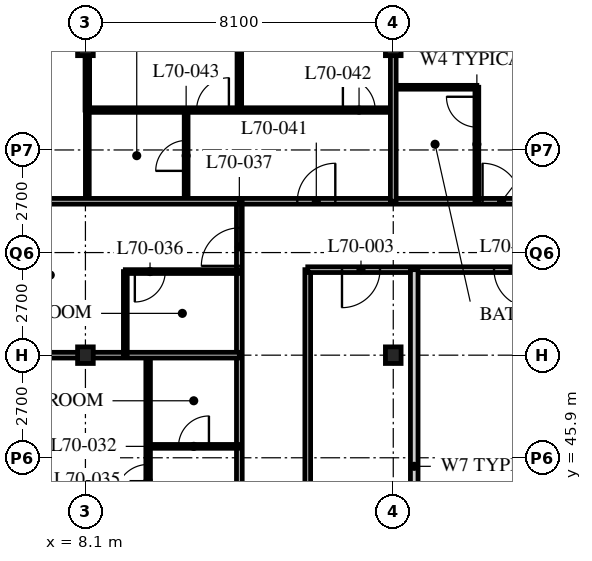
"""IFC4 building model, lengths in metres.
Left out: names, types, materials, properties, quantities, classifications, styles, units other than length and angle.
Written with IfcOpenShell. Run it as: python <this file> out.ifc"""

import sys

from ifc_helpers import new_model, si_unit, direction, frame, frame_2d, origin, origin_2d, place, context, subcontext, project, spatial, rectangle, i_section, extrude, element, fill, save


model = new_model("IFC4")
c1 = context("Model", 3, precision=1e-05, world=origin(), true_north=direction((0.0, 1.0)))
c2 = subcontext(c1, "Body", "Model", "MODEL_VIEW")
j1 = project(units=[si_unit("LENGTHUNIT", "METRE"), si_unit("PLANEANGLEUNIT", "RADIAN")], contexts=[c1])
p1 = place(None, origin())
s1 = spatial("IfcSite", under=j1, at=p1, CompositionType="ELEMENT")
p2 = place(p1, origin())
s2 = spatial("IfcBuilding", under=s1, at=p2, CompositionType="ELEMENT")
p3 = place(p2, frame((0.0, 0.0, 273.6)))
s3 = spatial("IfcBuildingStorey", under=s2, at=p3, CompositionType="ELEMENT", Elevation=273.6)
for number, where, z_axis, x_axis in (
    (1, (8.1, 48.6, 0.0), (0.0, 0.0, 1.0), (1.0, 0.0, 0.0)),
    (2, (8.1, 56.7, 0.0), (0.0, 0.0, 1.0), (1.0, 0.0, 0.0)),
    (3, (16.2, 48.6, 0.0), (0.0, 0.0, 1.0), (1.0, 0.0, 0.0)),
    (4, (16.2, 56.7, 0.0), (0.0, 0.0, 1.0), (1.0, 0.0, 0.0)),
):
    element("IfcColumn", number, at=place(p3, frame(where, z_axis=z_axis, x_axis=x_axis)), inside=s3, PredefinedType="COLUMN", context=c2, shape_type="SweptSolid", body=[
        extrude(i_section(OverallWidth=0.412, OverallDepth=0.437, WebThickness=0.036, FlangeThickness=0.058, FilletRadius=0.015, at=origin_2d()), origin(), (0.0, 0.0, 1.0), 3.9),
    ])
p4 = place(p3, frame((12.15, 52.65, 0.0), z_axis=(0.0, 0.0, 1.0), x_axis=(1.0, 0.0, 0.0)))
e5 = element("IfcWall", 5, at=p4, inside=s3, PredefinedType="PARTITIONING", context=c2, shape_type="SweptSolid", body=[
    extrude(rectangle(XDim=24.3, YDim=0.15, at=frame_2d((12.15, 0.0))), origin(), (0.0, 0.0, 1.0), 3.69),
])
p5 = place(p4, frame((6.4, 0.0, 0.0)))
e6 = element("IfcOpeningElement", 6, at=p5, cuts=e5, PredefinedType="OPENING", context=c2, shape_type="SweptSolid", body=[
    extrude(rectangle(XDim=1.0, YDim=2.1, at=frame_2d((0.5, 1.05))), frame((0.0, 0.085, 0.0), z_axis=(0.0, -1.0, 0.0), x_axis=(1.0, 0.0, 0.0)), (0.0, 0.0, 1.0), 0.17),
])
p6 = place(p4, frame((8.5, 0.0, 0.0)))
e7 = element("IfcOpeningElement", 7, at=p6, cuts=e5, PredefinedType="OPENING", context=c2, shape_type="SweptSolid", body=[
    extrude(rectangle(XDim=1.0, YDim=2.1, at=frame_2d((0.5, 1.05))), frame((0.0, 0.085, 0.0), z_axis=(0.0, -1.0, 0.0), x_axis=(1.0, 0.0, 0.0)), (0.0, 0.0, 1.0), 0.17),
])
p7 = place(p4, frame((16.6, 0.0, 0.0)))
e8 = element("IfcOpeningElement", 8, at=p7, cuts=e5, PredefinedType="OPENING", context=c2, shape_type="SweptSolid", body=[
    extrude(rectangle(XDim=1.0, YDim=2.1, at=frame_2d((0.5, 1.05))), frame((0.0, 0.085, 0.0), z_axis=(0.0, -1.0, 0.0), x_axis=(1.0, 0.0, 0.0)), (0.0, 0.0, 1.0), 0.17),
])
p8 = place(p4, frame((1.525, 0.0, 0.0)))
e9 = element("IfcOpeningElement", 9, at=p8, cuts=e5, PredefinedType="OPENING", context=c2, shape_type="SweptSolid", body=[
    extrude(rectangle(XDim=1.0, YDim=2.1, at=frame_2d((0.5, 1.05))), frame((0.0, 0.085, 0.0), z_axis=(0.0, -1.0, 0.0), x_axis=(1.0, 0.0, 0.0)), (0.0, 0.0, 1.0), 0.17),
])
p9 = place(p3, frame((12.15, 22.5, 0.0), z_axis=(0.0, 0.0, 1.0), x_axis=(0.0, 1.0, 0.0)))
e10 = element("IfcWall", 10, at=p9, inside=s3, PredefinedType="PARTITIONING", context=c2, shape_type="SweptSolid", body=[
    extrude(rectangle(XDim=30.15, YDim=0.15, at=frame_2d((15.075, 0.0))), origin(), (0.0, 0.0, 1.0), 3.69),
])
p10 = place(p9, frame((0.4, 0.0, 0.0)))
e11 = element("IfcOpeningElement", 11, at=p10, cuts=e10, PredefinedType="OPENING", context=c2, shape_type="SweptSolid", body=[
    extrude(rectangle(XDim=1.0, YDim=2.1, at=frame_2d((0.5, 1.05))), frame((0.0, 0.085, 0.0), z_axis=(0.0, -1.0, 0.0), x_axis=(1.0, 0.0, 0.0)), (0.0, 0.0, 1.0), 0.17),
])
p11 = place(p9, frame((18.4, 0.0, 0.0)))
e12 = element("IfcOpeningElement", 12, at=p11, cuts=e10, PredefinedType="OPENING", context=c2, shape_type="SweptSolid", body=[
    extrude(rectangle(XDim=1.0, YDim=2.1, at=frame_2d((0.5, 1.05))), frame((0.0, 0.085, 0.0), z_axis=(0.0, -1.0, 0.0), x_axis=(1.0, 0.0, 0.0)), (0.0, 0.0, 1.0), 0.17),
])
p12 = place(p9, frame((28.45, 0.0, 0.0)))
e13 = element("IfcOpeningElement", 13, at=p12, cuts=e10, PredefinedType="OPENING", context=c2, shape_type="SweptSolid", body=[
    extrude(rectangle(XDim=1.0, YDim=2.1, at=frame_2d((0.5, 1.05))), frame((0.0, 0.085, 0.0), z_axis=(0.0, -1.0, 0.0), x_axis=(1.0, 0.0, 0.0)), (0.0, 0.0, 1.0), 0.17),
])
p13 = place(p3, frame((13.95, 24.3, 0.0), z_axis=(0.0, 0.0, 1.0), x_axis=(0.0, 1.0, 0.0)))
e14 = element("IfcWall", 14, at=p13, inside=s3, PredefinedType="PARTITIONING", context=c2, shape_type="SweptSolid", body=[
    extrude(rectangle(XDim=26.55, YDim=0.15, at=frame_2d((13.275, 0.0))), origin(), (0.0, 0.0, 1.0), 3.69),
])
p14 = place(p13, frame((3.55, 0.0, 0.0)))
e15 = element("IfcOpeningElement", 15, at=p14, cuts=e14, PredefinedType="OPENING", context=c2, shape_type="SweptSolid", body=[
    extrude(rectangle(XDim=1.0, YDim=2.1, at=frame_2d((0.5, 1.05))), frame((0.0, 0.085, 0.0), z_axis=(0.0, -1.0, 0.0), x_axis=(1.0, 0.0, 0.0)), (0.0, 0.0, 1.0), 0.17),
])
p15 = place(p13, frame((11.65, 0.0, 0.0)))
e16 = element("IfcOpeningElement", 16, at=p15, cuts=e14, PredefinedType="OPENING", context=c2, shape_type="SweptSolid", body=[
    extrude(rectangle(XDim=1.0, YDim=2.1, at=frame_2d((0.5, 1.05))), frame((0.0, 0.085, 0.0), z_axis=(0.0, -1.0, 0.0), x_axis=(1.0, 0.0, 0.0)), (0.0, 0.0, 1.0), 0.17),
])
p16 = place(p3, frame((13.95, 50.85, 0.0), z_axis=(0.0, 0.0, 1.0), x_axis=(1.0, 0.0, 0.0)))
e17 = element("IfcWall", 17, at=p16, inside=s3, PredefinedType="PARTITIONING", context=c2, shape_type="SweptSolid", body=[
    extrude(rectangle(XDim=13.19, YDim=0.15, at=frame_2d((6.595, 0.0))), origin(), (0.0, 0.0, 1.0), 3.69),
])
p17 = place(p16, frame((0.901, 0.0, 0.0)))
e18 = element("IfcOpeningElement", 18, at=p17, cuts=e17, PredefinedType="OPENING", context=c2, shape_type="SweptSolid", body=[
    extrude(rectangle(XDim=1.0, YDim=2.1, at=frame_2d((0.5, 1.05))), frame((0.0, 0.085, 0.0), z_axis=(0.0, -1.0, 0.0), x_axis=(1.0, 0.0, 0.0)), (0.0, 0.0, 1.0), 0.17),
])
p18 = place(p16, frame((4.901, 0.0, 0.0)))
e19 = element("IfcOpeningElement", 19, at=p18, cuts=e17, PredefinedType="OPENING", context=c2, shape_type="SweptSolid", body=[
    extrude(rectangle(XDim=1.0, YDim=2.1, at=frame_2d((0.5, 1.05))), frame((0.0, 0.085, 0.0), z_axis=(0.0, -1.0, 0.0), x_axis=(1.0, 0.0, 0.0)), (0.0, 0.0, 1.0), 0.17),
])
p19 = place(p16, frame((10.101, 0.0, 0.0)))
e20 = element("IfcOpeningElement", 20, at=p19, cuts=e17, PredefinedType="OPENING", context=c2, shape_type="SweptSolid", body=[
    extrude(rectangle(XDim=1.0, YDim=2.1, at=frame_2d((0.5, 1.05))), frame((0.0, 0.085, 0.0), z_axis=(0.0, -1.0, 0.0), x_axis=(1.0, 0.0, 0.0)), (0.0, 0.0, 1.0), 0.17),
])
p20 = place(p3, frame((16.752, 50.85, 0.0), z_axis=(0.0, 0.0, 1.0), x_axis=(0.0, -1.0, 0.0)))
e21 = element("IfcWall", 21, at=p20, inside=s3, PredefinedType="SOLIDWALL", context=c2, shape_type="SweptSolid", body=[
    extrude(rectangle(XDim=10.35, YDim=0.2, at=frame_2d((5.175, 0.0))), origin(), (0.0, 0.0, 1.0), 3.69),
])
p21 = place(p3, frame((16.2, 55.65, 0.0), z_axis=(0.0, 0.0, 1.0), x_axis=(1.0, 0.0, 0.0)))
e22 = element("IfcWall", 22, at=p21, inside=s3, PredefinedType="PARTITIONING", context=c2, shape_type="SweptSolid", body=[
    extrude(rectangle(XDim=2.2, YDim=0.1, at=frame_2d((1.1, 0.0))), origin(), (0.0, 0.0, 1.0), 3.69),
])
p22 = place(p3, frame((18.4, 52.65, 0.0), z_axis=(0.0, 0.0, 1.0), x_axis=(0.0, 1.0, 0.0)))
e23 = element("IfcWall", 23, at=p22, inside=s3, PredefinedType="PARTITIONING", context=c2, shape_type="SweptSolid", body=[
    extrude(rectangle(XDim=3.0, YDim=0.1, at=frame_2d((1.5, 0.0))), origin(), (0.0, 0.0, 1.0), 3.69),
])
p23 = place(p22, frame((1.95, 0.0, 0.0)))
e24 = element("IfcOpeningElement", 24, at=p23, cuts=e23, PredefinedType="OPENING", context=c2, shape_type="SweptSolid", body=[
    extrude(rectangle(XDim=0.8, YDim=2.1, at=frame_2d((0.4, 1.05))), frame((0.0, 0.06, 0.0), z_axis=(0.0, -1.0, 0.0), x_axis=(1.0, 0.0, 0.0)), (0.0, 0.0, 1.0), 0.12),
])
p24 = place(p3, frame((9.75, 22.5, 0.0), z_axis=(0.0, 0.0, 1.0), x_axis=(0.0, 1.0, 0.0)))
e25 = element("IfcWall", 25, at=p24, inside=s3, PredefinedType="PARTITIONING", context=c2, shape_type="SweptSolid", body=[
    extrude(rectangle(XDim=26.1, YDim=0.12, at=frame_2d((13.05, 0.0))), origin(), (0.0, 0.0, 1.0), 3.69),
])
p25 = place(p24, frame((0.975, 0.0, 0.0)))
e26 = element("IfcOpeningElement", 26, at=p25, cuts=e25, PredefinedType="OPENING", context=c2, shape_type="SweptSolid", body=[
    extrude(rectangle(XDim=0.85, YDim=2.1, at=frame_2d((0.425, 1.05))), frame((0.0, 0.07, 0.0), z_axis=(0.0, -1.0, 0.0), x_axis=(1.0, 0.0, 0.0)), (0.0, 0.0, 1.0), 0.14),
])
p26 = place(p24, frame((10.225, 0.0, 0.0)))
e27 = element("IfcOpeningElement", 27, at=p26, cuts=e25, PredefinedType="OPENING", context=c2, shape_type="SweptSolid", body=[
    extrude(rectangle(XDim=0.85, YDim=2.1, at=frame_2d((0.425, 1.05))), frame((0.0, 0.07, 0.0), z_axis=(0.0, -1.0, 0.0), x_axis=(1.0, 0.0, 0.0)), (0.0, 0.0, 1.0), 0.14),
])
p27 = place(p24, frame((14.275, 0.0, 0.0)))
e28 = element("IfcOpeningElement", 28, at=p27, cuts=e25, PredefinedType="OPENING", context=c2, shape_type="SweptSolid", body=[
    extrude(rectangle(XDim=0.85, YDim=2.1, at=frame_2d((0.425, 1.05))), frame((0.0, 0.07, 0.0), z_axis=(0.0, -1.0, 0.0), x_axis=(1.0, 0.0, 0.0)), (0.0, 0.0, 1.0), 0.14),
])
p28 = place(p24, frame((18.975, 0.0, 0.0)))
e29 = element("IfcOpeningElement", 29, at=p28, cuts=e25, PredefinedType="OPENING", context=c2, shape_type="SweptSolid", body=[
    extrude(rectangle(XDim=0.85, YDim=2.1, at=frame_2d((0.425, 1.05))), frame((0.0, 0.07, 0.0), z_axis=(0.0, -1.0, 0.0), x_axis=(1.0, 0.0, 0.0)), (0.0, 0.0, 1.0), 0.14),
])
p29 = place(p24, frame((22.375, 0.0, 0.0)))
e30 = element("IfcOpeningElement", 30, at=p29, cuts=e25, PredefinedType="OPENING", context=c2, shape_type="SweptSolid", body=[
    extrude(rectangle(XDim=0.85, YDim=2.1, at=frame_2d((0.425, 1.05))), frame((0.0, 0.07, 0.0), z_axis=(0.0, -1.0, 0.0), x_axis=(1.0, 0.0, 0.0)), (0.0, 0.0, 1.0), 0.14),
])
p30 = place(p3, frame((12.15, 46.2, 0.0), z_axis=(0.0, 0.0, 1.0), x_axis=(-1.0, 0.0, 0.0)))
e31 = element("IfcWall", 31, at=p30, inside=s3, PredefinedType="PARTITIONING", context=c2, shape_type="SweptSolid", body=[
    extrude(rectangle(XDim=2.4, YDim=0.1, at=frame_2d((1.2, 0.0))), origin(), (0.0, 0.0, 1.0), 3.69),
])
p31 = place(p30, frame((0.8, 0.0, 0.0)))
e32 = element("IfcOpeningElement", 32, at=p31, cuts=e31, PredefinedType="OPENING", context=c2, shape_type="SweptSolid", body=[
    extrude(rectangle(XDim=0.8, YDim=2.1, at=frame_2d((0.4, 1.05))), frame((0.0, 0.06, 0.0), z_axis=(0.0, -1.0, 0.0), x_axis=(1.0, 0.0, 0.0)), (0.0, 0.0, 1.0), 0.12),
])
p32 = place(p3, frame((12.15, 48.6, 0.0), z_axis=(0.0, 0.0, 1.0), x_axis=(-1.0, 0.0, 0.0)))
e33 = element("IfcWall", 33, at=p32, inside=s3, PredefinedType="PARTITIONING", context=c2, shape_type="SweptSolid", body=[
    extrude(rectangle(XDim=11.85, YDim=0.15, at=frame_2d((5.925, 0.0))), origin(), (0.0, 0.0, 1.0), 3.078),
])
p33 = place(p3, frame((9.15, 48.6, 0.0), z_axis=(0.0, 0.0, 1.0), x_axis=(0.0, 1.0, 0.0)))
e34 = element("IfcWall", 34, at=p33, inside=s3, PredefinedType="PARTITIONING", context=c2, shape_type="SweptSolid", body=[
    extrude(rectangle(XDim=2.2, YDim=0.1, at=frame_2d((1.1, 0.0))), origin(), (0.0, 0.0, 1.0), 3.69),
])
p34 = place(p3, frame((12.15, 50.8, 0.0), z_axis=(0.0, 0.0, 1.0), x_axis=(-1.0, 0.0, 0.0)))
e35 = element("IfcWall", 35, at=p34, inside=s3, PredefinedType="PARTITIONING", context=c2, shape_type="SweptSolid", body=[
    extrude(rectangle(XDim=3.0, YDim=0.1, at=frame_2d((1.5, 0.0))), origin(), (0.0, 0.0, 1.0), 3.69),
])
p35 = place(p34, frame((1.95, 0.0, 0.0)))
e36 = element("IfcOpeningElement", 36, at=p35, cuts=e35, PredefinedType="OPENING", context=c2, shape_type="SweptSolid", body=[
    extrude(rectangle(XDim=0.8, YDim=2.1, at=frame_2d((0.4, 1.05))), frame((0.0, 0.06, 0.0), z_axis=(0.0, -1.0, 0.0), x_axis=(1.0, 0.0, 0.0)), (0.0, 0.0, 1.0), 0.12),
])
p36 = place(p3, frame((10.75, 52.65, 0.0), z_axis=(0.0, 0.0, 1.0), x_axis=(0.0, 1.0, 0.0)))
e37 = element("IfcWall", 37, at=p36, inside=s3, PredefinedType="PARTITIONING", context=c2, shape_type="SweptSolid", body=[
    extrude(rectangle(XDim=2.4, YDim=0.1, at=frame_2d((1.2, 0.0))), origin(), (0.0, 0.0, 1.0), 3.69),
])
p37 = place(p36, frame((0.8, 0.0, 0.0)))
e38 = element("IfcOpeningElement", 38, at=p37, cuts=e37, PredefinedType="OPENING", context=c2, shape_type="SweptSolid", body=[
    extrude(rectangle(XDim=0.8, YDim=2.1, at=frame_2d((0.4, 1.05))), frame((0.0, 0.06, 0.0), z_axis=(0.0, -1.0, 0.0), x_axis=(1.0, 0.0, 0.0)), (0.0, 0.0, 1.0), 0.12),
])
p38 = place(p3, frame((8.15, 52.65, 0.0), z_axis=(0.0, 0.0, 1.0), x_axis=(0.0, 1.0, 0.0)))
e39 = element("IfcWall", 39, at=p38, inside=s3, PredefinedType="PARTITIONING", context=c2, shape_type="SweptSolid", body=[
    extrude(rectangle(XDim=2.4, YDim=0.1, at=frame_2d((1.2, 0.0))), origin(), (0.0, 0.0, 1.0), 3.078),
])
p39 = place(p3, frame((8.15, 55.05, 0.0), z_axis=(0.0, 0.0, 1.0), x_axis=(1.0, 0.0, 0.0)))
e40 = element("IfcWall", 40, at=p39, inside=s3, PredefinedType="PARTITIONING", context=c2, shape_type="SweptSolid", body=[
    extrude(rectangle(XDim=8.05, YDim=0.12, at=frame_2d((4.025, 0.0))), origin(), (0.0, 0.0, 1.0), 3.69),
])
p40 = place(p39, frame((6.725, 0.0, 0.0)))
e41 = element("IfcOpeningElement", 41, at=p40, cuts=e40, PredefinedType="OPENING", context=c2, shape_type="SweptSolid", body=[
    extrude(rectangle(XDim=0.85, YDim=2.1, at=frame_2d((0.425, 1.05))), frame((0.0, 0.07, 0.0), z_axis=(0.0, -1.0, 0.0), x_axis=(1.0, 0.0, 0.0)), (0.0, 0.0, 1.0), 0.14),
])
p41 = place(p39, frame((2.875, 0.0, 0.0)))
e42 = element("IfcOpeningElement", 42, at=p41, cuts=e40, PredefinedType="OPENING", context=c2, shape_type="SweptSolid", body=[
    extrude(rectangle(XDim=0.85, YDim=2.1, at=frame_2d((0.425, 1.05))), frame((0.0, 0.07, 0.0), z_axis=(0.0, -1.0, 0.0), x_axis=(1.0, 0.0, 0.0)), (0.0, 0.0, 1.0), 0.14),
])
p42 = place(p3, frame((12.15, 55.05, 0.0), z_axis=(0.0, 0.0, 1.0), x_axis=(0.0, 1.0, 0.0)))
e43 = element("IfcWall", 43, at=p42, inside=s3, PredefinedType="PARTITIONING", context=c2, shape_type="SweptSolid", body=[
    extrude(rectangle(XDim=9.45, YDim=0.12, at=frame_2d((4.725, 0.0))), origin(), (0.0, 0.0, 1.0), 3.69),
])
p43 = place(p3, frame((0.3, 52.65, 0.0), z_axis=(0.0, 0.0, 1.0), x_axis=(1.0, 0.0, 0.0)))
e44 = element("IfcWall", 44, at=p43, inside=s3, PredefinedType="PARTITIONING", context=c2, shape_type="SweptSolid", body=[
    extrude(rectangle(XDim=11.85, YDim=0.15, at=frame_2d((5.925, 0.0))), origin(), (0.0, 0.0, 1.0), 3.69),
])
p44 = place(p3, frame((16.2, 52.65, 0.0), z_axis=(0.0, 0.0, 1.0), x_axis=(0.0, 1.0, 0.0)))
e45 = element("IfcWall", 45, at=p44, inside=s3, PredefinedType="PARTITIONING", context=c2, shape_type="SweptSolid", body=[
    extrude(rectangle(XDim=11.85, YDim=0.15, at=frame_2d((5.925, 0.0))), origin(), (0.0, 0.0, 1.0), 3.078),
])
p45 = place(p3, frame((8.15, 55.05, 0.0), z_axis=(0.0, 0.0, 1.0), x_axis=(0.0, 1.0, 0.0)))
e46 = element("IfcWall", 46, at=p45, inside=s3, PredefinedType="PARTITIONING", context=c2, shape_type="SweptSolid", body=[
    extrude(rectangle(XDim=1.447, YDim=0.12, at=frame_2d((0.724, 0.0))), origin(), (0.0, 0.0, 1.0), 3.078),
])
p46 = place(p17, origin())
e47 = element("IfcDoor", 47, at=p46, inside=s3, OperationType="SINGLE_SWING_RIGHT", PredefinedType="DOOR", context=c2, shape_type="SweptSolid", body=[
    extrude(rectangle(XDim=1.0, YDim=2.1, at=frame_2d((0.5, 1.05))), frame((0.0, 0.025, 0.0), z_axis=(0.0, -1.0, 0.0), x_axis=(1.0, 0.0, 0.0)), (0.0, 0.0, 1.0), 0.05),
])
fill(e18, e47)
p47 = place(p18, origin())
e48 = element("IfcDoor", 48, at=p47, inside=s3, OperationType="SINGLE_SWING_LEFT", PredefinedType="DOOR", context=c2, shape_type="SweptSolid", body=[
    extrude(rectangle(XDim=1.0, YDim=2.1, at=frame_2d((0.5, 1.05))), frame((0.0, 0.025, 0.0), z_axis=(0.0, -1.0, 0.0), x_axis=(1.0, 0.0, 0.0)), (0.0, 0.0, 1.0), 0.05),
])
fill(e19, e48)
p48 = place(p23, origin())
e49 = element("IfcDoor", 49, at=p48, inside=s3, OperationType="SINGLE_SWING_RIGHT", PredefinedType="DOOR", context=c2, shape_type="SweptSolid", body=[
    extrude(rectangle(XDim=0.8, YDim=2.1, at=frame_2d((0.4, 1.05))), frame((0.0, 0.025, 0.0), z_axis=(0.0, -1.0, 0.0), x_axis=(1.0, 0.0, 0.0)), (0.0, 0.0, 1.0), 0.05),
])
fill(e24, e49)
p49 = place(p5, origin())
e50 = element("IfcDoor", 50, at=p49, inside=s3, OperationType="SINGLE_SWING_LEFT", PredefinedType="DOOR", context=c2, shape_type="SweptSolid", body=[
    extrude(rectangle(XDim=1.0, YDim=2.1, at=frame_2d((0.5, 1.05))), frame((0.0, 0.025, 0.0), z_axis=(0.0, -1.0, 0.0), x_axis=(1.0, 0.0, 0.0)), (0.0, 0.0, 1.0), 0.05),
])
fill(e6, e50)
p50 = place(p31, origin())
e51 = element("IfcDoor", 51, at=p50, inside=s3, OperationType="SINGLE_SWING_RIGHT", PredefinedType="DOOR", context=c2, shape_type="SweptSolid", body=[
    extrude(rectangle(XDim=0.8, YDim=2.1, at=frame_2d((0.4, 1.05))), frame((0.0, 0.025, 0.0), z_axis=(0.0, -1.0, 0.0), x_axis=(1.0, 0.0, 0.0)), (0.0, 0.0, 1.0), 0.05),
])
fill(e32, e51)
p51 = place(p29, origin())
e52 = element("IfcDoor", 52, at=p51, inside=s3, OperationType="SINGLE_SWING_LEFT", PredefinedType="DOOR", context=c2, shape_type="SweptSolid", body=[
    extrude(rectangle(XDim=0.85, YDim=2.1, at=frame_2d((0.425, 1.05))), frame((0.0, 0.025, 0.0), z_axis=(0.0, -1.0, 0.0), x_axis=(1.0, 0.0, 0.0)), (0.0, 0.0, 1.0), 0.05),
])
fill(e30, e52)
p52 = place(p35, origin())
e53 = element("IfcDoor", 53, at=p52, inside=s3, OperationType="SINGLE_SWING_RIGHT", PredefinedType="DOOR", context=c2, shape_type="SweptSolid", body=[
    extrude(rectangle(XDim=0.8, YDim=2.1, at=frame_2d((0.4, 1.05))), frame((0.0, 0.025, 0.0), z_axis=(0.0, -1.0, 0.0), x_axis=(1.0, 0.0, 0.0)), (0.0, 0.0, 1.0), 0.05),
])
fill(e36, e53)
p53 = place(p12, origin())
e54 = element("IfcDoor", 54, at=p53, inside=s3, OperationType="SINGLE_SWING_LEFT", PredefinedType="DOOR", context=c2, shape_type="SweptSolid", body=[
    extrude(rectangle(XDim=1.0, YDim=2.1, at=frame_2d((0.5, 1.05))), frame((0.0, 0.025, 0.0), z_axis=(0.0, -1.0, 0.0), x_axis=(1.0, 0.0, 0.0)), (0.0, 0.0, 1.0), 0.05),
])
fill(e13, e54)
p54 = place(p8, origin())
e55 = element("IfcDoor", 55, at=p54, inside=s3, OperationType="SINGLE_SWING_RIGHT", PredefinedType="DOOR", context=c2, shape_type="SweptSolid", body=[
    extrude(rectangle(XDim=1.0, YDim=2.1, at=frame_2d((0.5, 1.05))), frame((0.0, 0.025, 0.0), z_axis=(0.0, -1.0, 0.0), x_axis=(1.0, 0.0, 0.0)), (0.0, 0.0, 1.0), 0.05),
])
fill(e9, e55)
p55 = place(p40, origin())
e56 = element("IfcDoor", 56, at=p55, inside=s3, OperationType="SINGLE_SWING_LEFT", PredefinedType="DOOR", context=c2, shape_type="SweptSolid", body=[
    extrude(rectangle(XDim=0.85, YDim=2.1, at=frame_2d((0.425, 1.05))), frame((0.0, 0.025, 0.0), z_axis=(0.0, -1.0, 0.0), x_axis=(1.0, 0.0, 0.0)), (0.0, 0.0, 1.0), 0.05),
])
fill(e41, e56)
p56 = place(p37, origin())
e57 = element("IfcDoor", 57, at=p56, inside=s3, OperationType="SINGLE_SWING_LEFT", PredefinedType="DOOR", context=c2, shape_type="SweptSolid", body=[
    extrude(rectangle(XDim=0.8, YDim=2.1, at=frame_2d((0.4, 1.05))), frame((0.0, 0.025, 0.0), z_axis=(0.0, -1.0, 0.0), x_axis=(1.0, 0.0, 0.0)), (0.0, 0.0, 1.0), 0.05),
])
fill(e38, e57)
p57 = place(p41, origin())
e58 = element("IfcDoor", 58, at=p57, inside=s3, OperationType="SINGLE_SWING_RIGHT", PredefinedType="DOOR", context=c2, shape_type="SweptSolid", body=[
    extrude(rectangle(XDim=0.85, YDim=2.1, at=frame_2d((0.425, 1.05))), frame((0.0, 0.025, 0.0), z_axis=(0.0, -1.0, 0.0), x_axis=(1.0, 0.0, 0.0)), (0.0, 0.0, 1.0), 0.05),
])
fill(e42, e58)
save(model, sys.argv[1])
